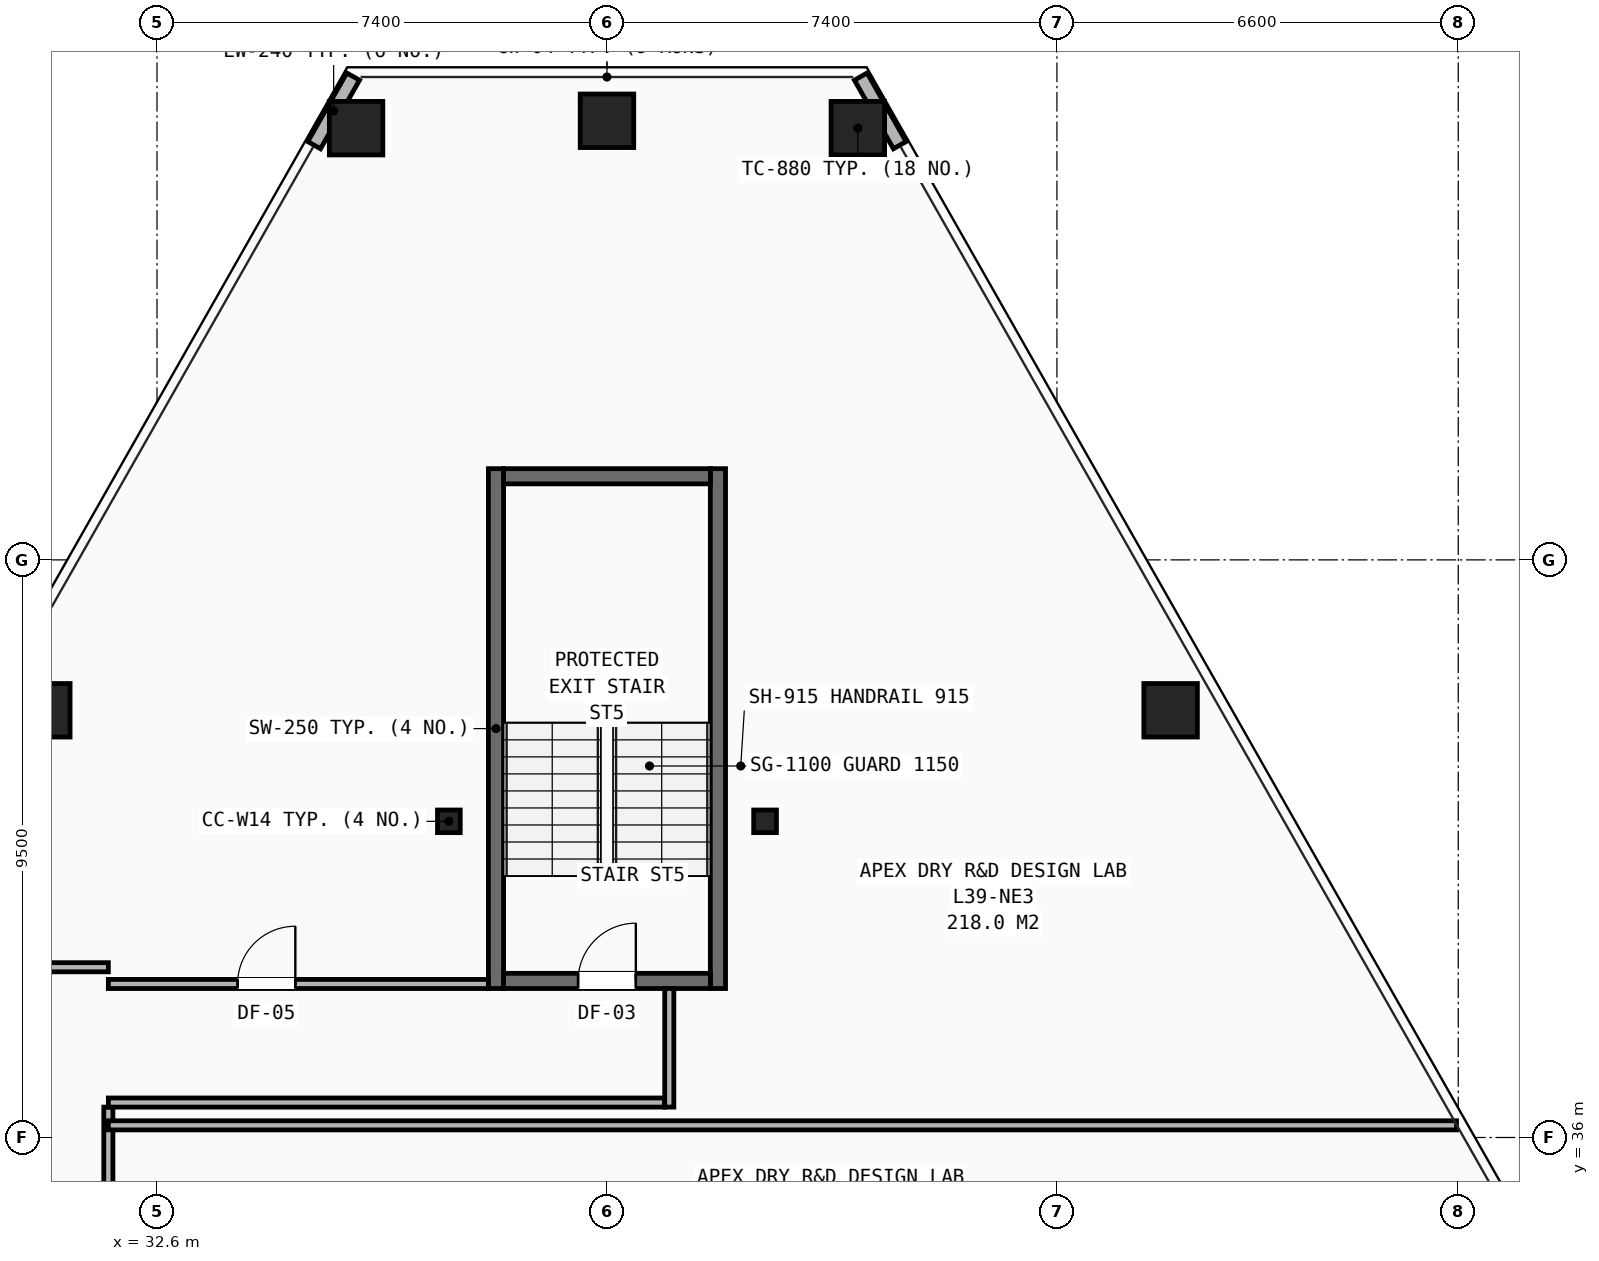
"""IFC4 building model, lengths in metres.
Left out: names, types, materials, properties, quantities, classifications, styles, units other than length and angle.
Written with IfcOpenShell. Run it as: python <this file> out.ifc"""

import sys

from ifc_helpers import new_model, si_unit, direction, frame, frame_2d, origin, origin_2d, place, context, subcontext, project, spatial, rectangle, hollow_rectangle, i_section, extrude, element, fill, save


model = new_model("IFC4")
c1 = context("Model", 3, precision=1e-05, world=origin(), true_north=direction((0.0, 1.0)))
c2 = subcontext(c1, "Body", "Model", "MODEL_VIEW")
j1 = project(units=[si_unit("LENGTHUNIT", "METRE"), si_unit("PLANEANGLEUNIT", "RADIAN")], contexts=[c1])
p1 = place(None, origin())
s1 = spatial("IfcSite", under=j1, at=p1, CompositionType="ELEMENT")
p2 = place(p1, origin())
s2 = spatial("IfcBuilding", under=s1, at=p2, CompositionType="ELEMENT")
p3 = place(p2, frame((0.0, 0.0, 136.7)))
s3 = spatial("IfcBuildingStorey", under=s2, at=p3, CompositionType="ELEMENT", Elevation=136.7)
for number, where, z_axis, x_axis in (
    (1, (37.4, 41.2, 0.0), (0.0, 0.0, 1.0), (1.0, 0.0, 0.0)),
    (2, (42.6, 41.2, 0.0), (0.0, 0.0, 1.0), (1.0, 0.0, 0.0)),
):
    element("IfcColumn", number, at=place(p3, frame(where, z_axis=z_axis, x_axis=x_axis)), inside=s3, PredefinedType="COLUMN", context=c2, shape_type="SweptSolid", body=[
        extrude(i_section(OverallWidth=0.374, OverallDepth=0.372, WebThickness=0.016, FlangeThickness=0.026, at=origin_2d()), origin(), (0.0, 0.0, 1.0), 3.45),
    ])
for number, where, z_axis, x_axis in (
    (3, (44.126, 52.6, 0.0), (0.0, 0.0, 1.0), (1.0, 0.0, 0.0)),
    (4, (40.0, 52.722, 0.0), (0.0, 0.0, 1.0), (1.0, 0.0, 0.0)),
    (5, (35.874, 52.6, 0.0), (0.0, 0.0, 1.0), (1.0, 0.0, 0.0)),
    (6, (30.73, 43.026, 0.0), (0.0, 0.0, 1.0), (1.0, 0.0, 0.0)),
    (7, (49.27, 43.026, 0.0), (0.0, 0.0, 1.0), (1.0, 0.0, 0.0)),
):
    element("IfcColumn", number, at=place(p3, frame(where, z_axis=z_axis, x_axis=x_axis)), inside=s3, PredefinedType="COLUMN", context=c2, shape_type="SweptSolid", body=[
        extrude(hollow_rectangle(XDim=0.88, YDim=0.88, WallThickness=0.06, at=origin_2d()), origin(), (0.0, 0.0, 1.0), 3.45),
    ])
for number, where, z_axis, x_axis in (
    (8, (35.826, 53.449, 0.0), (0.0, 0.0, 1.0), (-0.494, -0.869, 0.0)),
    (9, (44.815, 52.321, 0.0), (0.0, 0.0, 1.0), (-0.494, 0.869, 0.0)),
):
    element("IfcWall", number, at=place(p3, frame(where, z_axis=z_axis, x_axis=x_axis)), inside=s3, PredefinedType="SHEAR", context=c2, shape_type="SweptSolid", body=[
        extrude(rectangle(XDim=1.298, YDim=0.24, at=frame_2d((0.649, 0.0))), origin(), (0.0, 0.0, 1.0), 2.583),
    ])
p4 = place(p3, frame((31.8, 31.2, 0.0), z_axis=(0.0, 0.0, 1.0), x_axis=(0.0, 1.0, 0.0)))
e10 = element("IfcWall", 10, at=p4, inside=s3, PredefinedType="PARTITIONING", context=c2, shape_type="SweptSolid", body=[
    extrude(rectangle(XDim=5.3, YDim=0.15, at=frame_2d((2.65, 0.0))), origin(), (0.0, 0.0, 1.0), 2.225),
])
p5 = place(p4, frame((0.5, 0.0, 0.0)))
e11 = element("IfcOpeningElement", 11, at=p5, cuts=e10, PredefinedType="OPENING", context=c2, shape_type="SweptSolid", body=[
    extrude(rectangle(XDim=0.95, YDim=2.1, at=frame_2d((0.475, 1.05))), frame((0.0, 0.085, 0.0), z_axis=(0.0, -1.0, 0.0), x_axis=(1.0, 0.0, 0.0)), (0.0, 0.0, 1.0), 0.17),
])
p6 = place(p4, frame((2.9, 0.0, 0.0)))
e12 = element("IfcOpeningElement", 12, at=p6, cuts=e10, PredefinedType="OPENING", context=c2, shape_type="SweptSolid", body=[
    extrude(rectangle(XDim=0.95, YDim=2.1, at=frame_2d((0.475, 1.05))), frame((0.0, 0.085, 0.0), z_axis=(0.0, -1.0, 0.0), x_axis=(1.0, 0.0, 0.0)), (0.0, 0.0, 1.0), 0.17),
])
p7 = place(p3, frame((29.6, 38.8, 0.0), z_axis=(0.0, 0.0, 1.0), x_axis=(1.0, 0.0, 0.0)))
e13 = element("IfcWall", 13, at=p7, inside=s3, PredefinedType="PARTITIONING", context=c2, shape_type="SweptSolid", body=[
    extrude(rectangle(XDim=2.2, YDim=0.15, at=frame_2d((1.1, 0.0))), origin(), (0.0, 0.0, 1.0), 2.743),
])
p8 = place(p3, frame((31.8, 36.2, 0.0), z_axis=(0.0, 0.0, 1.0), x_axis=(1.0, 0.0, 0.0)))
e14 = element("IfcWall", 14, at=p8, inside=s3, PredefinedType="PARTITIONING", context=c2, shape_type="SweptSolid", body=[
    extrude(rectangle(XDim=22.172, YDim=0.15, at=frame_2d((11.086, 0.0))), origin(), (0.0, 0.0, 1.0), 2.589),
])
for number, where, z_axis, x_axis in (
    (15, (38.175, 38.45, 0.0), (0.0, 0.0, 1.0), (0.0, 1.0, 0.0)),
    (16, (41.825, 38.45, 0.0), (0.0, 0.0, 1.0), (0.0, 1.0, 0.0)),
):
    element("IfcWall", number, at=place(p3, frame(where, z_axis=z_axis, x_axis=x_axis)), inside=s3, PredefinedType="SHEAR", context=c2, shape_type="SweptSolid", body=[
        extrude(rectangle(XDim=8.55, YDim=0.25, at=frame_2d((4.275, 0.0))), origin(), (0.0, 0.0, 1.0), 3.21),
    ])
p9 = place(p3, frame((38.3, 38.575, 0.0), z_axis=(0.0, 0.0, 1.0), x_axis=(1.0, 0.0, 0.0)))
e17 = element("IfcWall", 17, at=p9, inside=s3, PredefinedType="SHEAR", context=c2, shape_type="SweptSolid", body=[
    extrude(rectangle(XDim=3.4, YDim=0.25, at=frame_2d((1.7, 0.0))), origin(), (0.0, 0.0, 1.0), 3.21),
])
p10 = place(p9, frame((1.225, 0.0, 0.0)))
e18 = element("IfcOpeningElement", 18, at=p10, cuts=e17, PredefinedType="OPENING", context=c2, shape_type="SweptSolid", body=[
    extrude(rectangle(XDim=0.95, YDim=2.1, at=frame_2d((0.475, 1.05))), frame((0.0, 0.135, 0.0), z_axis=(0.0, -1.0, 0.0), x_axis=(1.0, 0.0, 0.0)), (0.0, 0.0, 1.0), 0.27),
])
p11 = place(p3, frame((38.3, 46.875, 0.0), z_axis=(0.0, 0.0, 1.0), x_axis=(1.0, 0.0, 0.0)))
e19 = element("IfcWall", 19, at=p11, inside=s3, PredefinedType="SHEAR", context=c2, shape_type="SweptSolid", body=[
    extrude(rectangle(XDim=3.4, YDim=0.25, at=frame_2d((1.7, 0.0))), origin(), (0.0, 0.0, 1.0), 3.21),
])
p12 = place(p3, frame((31.8, 36.575, 0.0), z_axis=(0.0, 0.0, 1.0), x_axis=(1.0, 0.0, 0.0)))
e20 = element("IfcWall", 20, at=p12, inside=s3, PredefinedType="PARTITIONING", context=c2, shape_type="SweptSolid", body=[
    extrude(rectangle(XDim=9.15, YDim=0.15, at=frame_2d((4.575, 0.0))), origin(), (0.0, 0.0, 1.0), 3.21),
])
p13 = place(p3, frame((31.8, 38.525, 0.0), z_axis=(0.0, 0.0, 1.0), x_axis=(1.0, 0.0, 0.0)))
e21 = element("IfcWall", 21, at=p13, inside=s3, PredefinedType="PARTITIONING", context=c2, shape_type="SweptSolid", body=[
    extrude(rectangle(XDim=6.25, YDim=0.15, at=frame_2d((3.125, 0.0))), origin(), (0.0, 0.0, 1.0), 2.743),
])
p14 = place(p13, frame((2.125, 0.0, 0.0)))
e22 = element("IfcOpeningElement", 22, at=p14, cuts=e21, PredefinedType="OPENING", context=c2, shape_type="SweptSolid", body=[
    extrude(rectangle(XDim=0.95, YDim=2.1, at=frame_2d((0.475, 1.05))), frame((0.0, 0.085, 0.0), z_axis=(0.0, -1.0, 0.0), x_axis=(1.0, 0.0, 0.0)), (0.0, 0.0, 1.0), 0.17),
])
p15 = place(p3, frame((41.025, 36.5, 0.0), z_axis=(0.0, 0.0, 1.0), x_axis=(0.0, 1.0, 0.0)))
e23 = element("IfcWall", 23, at=p15, inside=s3, PredefinedType="PARTITIONING", context=c2, shape_type="SweptSolid", body=[
    extrude(rectangle(XDim=1.95, YDim=0.15, at=frame_2d((0.975, 0.0))), origin(), (0.0, 0.0, 1.0), 3.21),
])
p16 = place(p14, origin())
e24 = element("IfcDoor", 24, at=p16, inside=s3, OperationType="SINGLE_SWING_RIGHT", PredefinedType="DOOR", context=c2, shape_type="SweptSolid", body=[
    extrude(rectangle(XDim=0.95, YDim=2.1, at=frame_2d((0.475, 1.05))), frame((0.0, 0.025, 0.0), z_axis=(0.0, -1.0, 0.0), x_axis=(1.0, 0.0, 0.0)), (0.0, 0.0, 1.0), 0.05),
])
fill(e22, e24)
p17 = place(p10, origin())
e25 = element("IfcDoor", 25, at=p17, inside=s3, OperationType="SINGLE_SWING_RIGHT", PredefinedType="DOOR", context=c2, shape_type="SweptSolid", body=[
    extrude(rectangle(XDim=0.95, YDim=2.1, at=frame_2d((0.475, 1.05))), frame((0.0, 0.025, 0.0), z_axis=(0.0, -1.0, 0.0), x_axis=(1.0, 0.0, 0.0)), (0.0, 0.0, 1.0), 0.05),
])
fill(e18, e25)
save(model, sys.argv[1])
